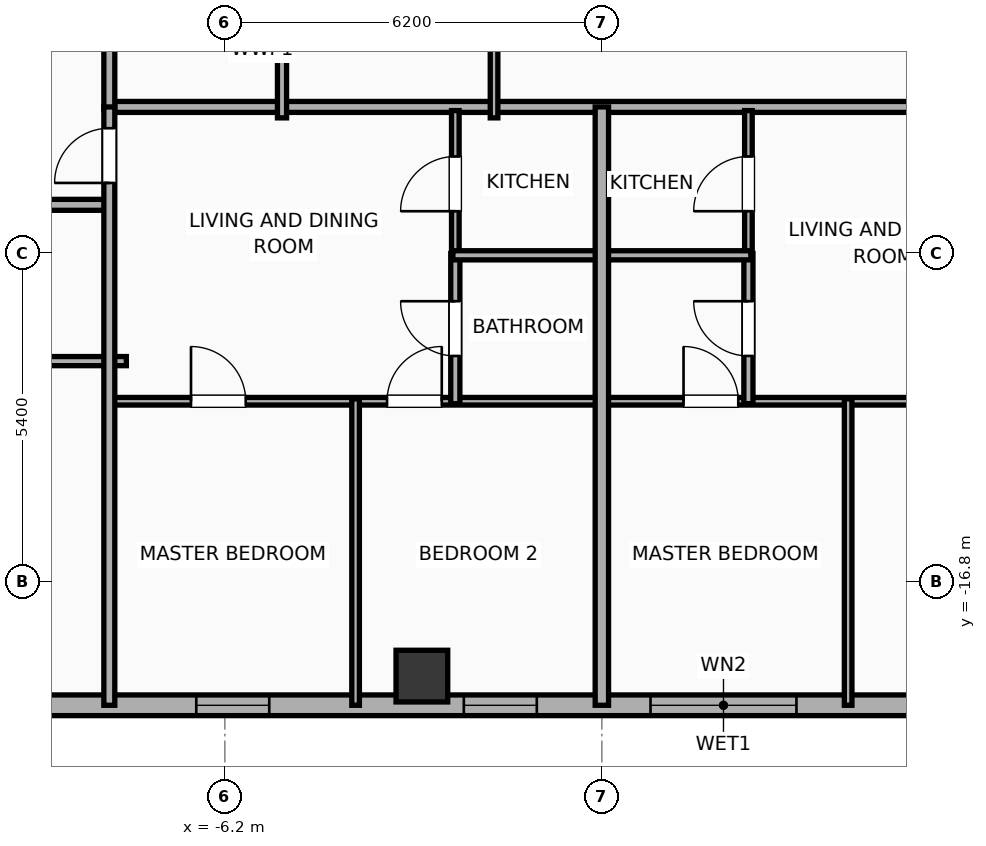
"""IFC4 building model, lengths in metres.
Left out: names, types, materials, properties, quantities, classifications, styles, units other than length and angle.
Written with IfcOpenShell. Run it as: python <this file> out.ifc"""

import sys

from ifc_helpers import new_model, si_unit, direction, frame, frame_2d, origin, origin_2d, place, context, subcontext, project, spatial, rectangle, hollow_rectangle, extrude, element, fill, save


model = new_model("IFC4")
c1 = context("Model", 3, precision=1e-05, world=origin(), true_north=direction((0.0, 1.0)))
c2 = subcontext(c1, "Body", "Model", "MODEL_VIEW")
j1 = project(units=[si_unit("LENGTHUNIT", "METRE"), si_unit("PLANEANGLEUNIT", "RADIAN")], contexts=[c1])
p1 = place(None, origin())
s1 = spatial("IfcSite", under=j1, at=p1, CompositionType="ELEMENT")
p2 = place(p1, origin())
s2 = spatial("IfcBuilding", under=s1, at=p2, CompositionType="ELEMENT")
p3 = place(p2, frame((0.0, 0.0, 247.0)))
s3 = spatial("IfcBuildingStorey", under=s2, at=p3, CompositionType="ELEMENT", Elevation=247.0)
p4 = place(p3, frame((-2.96, -18.35, 0.0), z_axis=(0.0, 0.0, 1.0), x_axis=(1.0, 0.0, 0.0)))
e1 = element("IfcColumn", 1, at=p4, inside=s3, PredefinedType="COLUMN", context=c2, shape_type="SweptSolid", body=[
    extrude(hollow_rectangle(XDim=0.85, YDim=0.85, WallThickness=0.028, at=origin_2d()), origin(), (0.0, 0.0, 1.0), 3.9),
])
p5 = place(p3, frame((26.783, -18.83, 0.0), z_axis=(0.0, 0.0, 1.0), x_axis=(-1.0, 0.0, 0.0)))
e2 = element("IfcWall", 2, at=p5, inside=s3, PredefinedType="ELEMENTEDWALL", context=c2, shape_type="SweptSolid", body=[
    extrude(rectangle(XDim=49.566, YDim=0.34, at=frame_2d((24.783, 0.0))), origin(), (0.0, 0.0, 1.0), 3.65),
])
p6 = place(p5, frame((23.583, 0.0, 0.75)))
e3 = element("IfcOpeningElement", 3, at=p6, cuts=e2, PredefinedType="OPENING", context=c2, shape_type="SweptSolid", body=[
    extrude(rectangle(XDim=2.4, YDim=2.1, at=frame_2d((1.2, 1.05))), frame((0.0, 0.18, 0.0), z_axis=(0.0, -1.0, 0.0), x_axis=(1.0, 0.0, 0.0)), (0.0, 0.0, 1.0), 0.36),
])
p7 = place(p5, frame((41.756, 0.0, 0.75)))
e4 = element("IfcOpeningElement", 4, at=p7, cuts=e2, PredefinedType="OPENING", context=c2, shape_type="SweptSolid", body=[
    extrude(rectangle(XDim=2.4, YDim=2.1, at=frame_2d((1.2, 1.05))), frame((0.0, 0.18, 0.0), z_axis=(0.0, -1.0, 0.0), x_axis=(1.0, 0.0, 0.0)), (0.0, 0.0, 1.0), 0.36),
])
p8 = place(p5, frame((47.222, 0.0, 0.75)))
e5 = element("IfcOpeningElement", 5, at=p8, cuts=e2, PredefinedType="OPENING", context=c2, shape_type="SweptSolid", body=[
    extrude(rectangle(XDim=1.2, YDim=2.05, at=frame_2d((0.6, 1.025))), frame((0.0, 0.18, 0.0), z_axis=(0.0, -1.0, 0.0), x_axis=(1.0, 0.0, 0.0)), (0.0, 0.0, 1.0), 0.36),
])
p9 = place(p5, frame((45.131, 0.0, 0.75)))
e6 = element("IfcOpeningElement", 6, at=p9, cuts=e2, PredefinedType="OPENING", context=c2, shape_type="SweptSolid", body=[
    extrude(rectangle(XDim=1.2, YDim=2.05, at=frame_2d((0.6, 1.025))), frame((0.0, 0.18, 0.0), z_axis=(0.0, -1.0, 0.0), x_axis=(1.0, 0.0, 0.0)), (0.0, 0.0, 1.0), 0.36),
])
p10 = place(p5, frame((37.289, 0.0, 0.75)))
e7 = element("IfcOpeningElement", 7, at=p10, cuts=e2, PredefinedType="OPENING", context=c2, shape_type="SweptSolid", body=[
    extrude(rectangle(XDim=1.2, YDim=2.05, at=frame_2d((0.6, 1.025))), frame((0.0, 0.18, 0.0), z_axis=(0.0, -1.0, 0.0), x_axis=(1.0, 0.0, 0.0)), (0.0, 0.0, 1.0), 0.36),
])
p11 = place(p5, frame((15.715, 0.0, 0.75)))
e8 = element("IfcOpeningElement", 8, at=p11, cuts=e2, PredefinedType="OPENING", context=c2, shape_type="SweptSolid", body=[
    extrude(rectangle(XDim=1.2, YDim=2.05, at=frame_2d((0.6, 1.025))), frame((0.0, 0.18, 0.0), z_axis=(0.0, -1.0, 0.0), x_axis=(1.0, 0.0, 0.0)), (0.0, 0.0, 1.0), 0.36),
])
p12 = place(p5, frame((12.022, 0.0, 0.75)))
e9 = element("IfcOpeningElement", 9, at=p12, cuts=e2, PredefinedType="OPENING", context=c2, shape_type="SweptSolid", body=[
    extrude(rectangle(XDim=1.2, YDim=2.05, at=frame_2d((0.6, 1.025))), frame((0.0, 0.18, 0.0), z_axis=(0.0, -1.0, 0.0), x_axis=(1.0, 0.0, 0.0)), (0.0, 0.0, 1.0), 0.36),
])
p13 = place(p5, frame((8.09, 0.0, 0.75)))
e10 = element("IfcOpeningElement", 10, at=p13, cuts=e2, PredefinedType="OPENING", context=c2, shape_type="SweptSolid", body=[
    extrude(rectangle(XDim=1.2, YDim=2.05, at=frame_2d((0.6, 1.025))), frame((0.0, 0.18, 0.0), z_axis=(0.0, -1.0, 0.0), x_axis=(1.0, 0.0, 0.0)), (0.0, 0.0, 1.0), 0.36),
])
p14 = place(p5, frame((4.637, 0.0, 0.75)))
e11 = element("IfcOpeningElement", 11, at=p14, cuts=e2, PredefinedType="OPENING", context=c2, shape_type="SweptSolid", body=[
    extrude(rectangle(XDim=1.2, YDim=2.05, at=frame_2d((0.6, 1.025))), frame((0.0, 0.18, 0.0), z_axis=(0.0, -1.0, 0.0), x_axis=(1.0, 0.0, 0.0)), (0.0, 0.0, 1.0), 0.36),
])
p15 = place(p5, frame((1.811, 0.0, 0.75)))
e12 = element("IfcOpeningElement", 12, at=p15, cuts=e2, PredefinedType="OPENING", context=c2, shape_type="SweptSolid", body=[
    extrude(rectangle(XDim=1.2, YDim=2.05, at=frame_2d((0.6, 1.025))), frame((0.0, 0.18, 0.0), z_axis=(0.0, -1.0, 0.0), x_axis=(1.0, 0.0, 0.0)), (0.0, 0.0, 1.0), 0.36),
])
p16 = place(p5, frame((32.253, 0.0, 0.75)))
e13 = element("IfcOpeningElement", 13, at=p16, cuts=e2, PredefinedType="OPENING", context=c2, shape_type="SweptSolid", body=[
    extrude(rectangle(XDim=1.2, YDim=2.05, at=frame_2d((0.6, 1.025))), frame((0.0, 0.18, 0.0), z_axis=(0.0, -1.0, 0.0), x_axis=(1.0, 0.0, 0.0)), (0.0, 0.0, 1.0), 0.36),
])
p17 = place(p5, frame((27.853, 0.0, 0.75)))
e14 = element("IfcOpeningElement", 14, at=p17, cuts=e2, PredefinedType="OPENING", context=c2, shape_type="SweptSolid", body=[
    extrude(rectangle(XDim=1.2, YDim=2.05, at=frame_2d((0.6, 1.025))), frame((0.0, 0.18, 0.0), z_axis=(0.0, -1.0, 0.0), x_axis=(1.0, 0.0, 0.0)), (0.0, 0.0, 1.0), 0.36),
])
p18 = place(p5, frame((20.473, 0.0, 0.75)))
e15 = element("IfcOpeningElement", 15, at=p18, cuts=e2, PredefinedType="OPENING", context=c2, shape_type="SweptSolid", body=[
    extrude(rectangle(XDim=1.2, YDim=2.05, at=frame_2d((0.6, 1.025))), frame((0.0, 0.18, 0.0), z_axis=(0.0, -1.0, 0.0), x_axis=(1.0, 0.0, 0.0)), (0.0, 0.0, 1.0), 0.36),
])
p19 = place(p3, frame((-8.15, -8.99, 0.0), z_axis=(0.0, 0.0, 1.0), x_axis=(1.0, 0.0, 0.0)))
e16 = element("IfcWall", 16, at=p19, inside=s3, PredefinedType="PARTITIONING", context=c2, shape_type="SweptSolid", body=[
    extrude(rectangle(XDim=16.3, YDim=0.18, at=frame_2d((8.15, 0.0))), origin(), (0.0, 0.0, 1.0), 3.65),
])
p20 = place(p3, frame((-8.1, -9.03, 0.0), z_axis=(0.0, 0.0, 1.0), x_axis=(0.0, 1.0, 0.0)))
e17 = element("IfcWall", 17, at=p20, inside=s3, PredefinedType="PARTITIONING", context=c2, shape_type="SweptSolid", body=[
    extrude(rectangle(XDim=18.06, YDim=0.18, at=frame_2d((9.03, 0.0))), origin(), (0.0, 0.0, 1.0), 3.65),
])
p21 = place(p20, frame((1.306, 0.0, 0.0)))
e18 = element("IfcOpeningElement", 18, at=p21, cuts=e17, PredefinedType="OPENING", context=c2, shape_type="SweptSolid", body=[
    extrude(rectangle(XDim=1.0, YDim=2.05, at=frame_2d((0.5, 1.025))), frame((0.0, 0.1, 0.0), z_axis=(0.0, -1.0, 0.0), x_axis=(1.0, 0.0, 0.0)), (0.0, 0.0, 1.0), 0.2),
])
p22 = place(p20, frame((10.361, 0.0, 0.0)))
e19 = element("IfcOpeningElement", 19, at=p22, cuts=e17, PredefinedType="OPENING", context=c2, shape_type="SweptSolid", body=[
    extrude(rectangle(XDim=0.95, YDim=2.05, at=frame_2d((0.475, 1.025))), frame((0.0, 0.1, 0.0), z_axis=(0.0, -1.0, 0.0), x_axis=(1.0, 0.0, 0.0)), (0.0, 0.0, 1.0), 0.2),
])
p23 = place(p3, frame((-5.26, -9.17, 0.0), z_axis=(0.0, 0.0, 1.0), x_axis=(0.0, 1.0, 0.0)))
e20 = element("IfcWall", 20, at=p23, inside=s3, PredefinedType="PLUMBINGWALL", context=c2, shape_type="SweptSolid", body=[
    extrude(rectangle(XDim=3.35, YDim=0.15, at=frame_2d((1.675, 0.0))), origin(), (0.0, 0.0, 1.0), 3.65),
])
p24 = place(p3, frame((-1.773, -9.17, 0.0), z_axis=(0.0, 0.0, 1.0), x_axis=(0.0, 1.0, 0.0)))
e21 = element("IfcWall", 21, at=p24, inside=s3, PredefinedType="PARTITIONING", context=c2, shape_type="SweptSolid", body=[
    extrude(rectangle(XDim=18.29, YDim=0.125, at=frame_2d((9.145, 0.0))), origin(), (0.0, 0.0, 1.0), 3.65),
])
p25 = place(p24, frame((8.67, 0.0, 0.0)))
e22 = element("IfcOpeningElement", 22, at=p25, cuts=e21, PredefinedType="OPENING", context=c2, shape_type="SweptSolid", body=[
    extrude(rectangle(XDim=0.95, YDim=2.05, at=frame_2d((0.475, 1.025))), frame((0.0, 0.073, 0.0), z_axis=(0.0, -1.0, 0.0), x_axis=(1.0, 0.0, 0.0)), (0.0, 0.0, 1.0), 0.145),
])
p26 = place(p3, frame((-10.217, -13.17, 0.0), z_axis=(0.0, 0.0, 1.0), x_axis=(1.0, 0.0, 0.0)))
e23 = element("IfcWall", 23, at=p26, inside=s3, PredefinedType="PLUMBINGWALL", context=c2, shape_type="SweptSolid", body=[
    extrude(rectangle(XDim=2.397, YDim=0.15, at=frame_2d((1.198, 0.0))), origin(), (0.0, 0.0, 1.0), 3.65),
])
p27 = place(p3, frame((-26.23, -10.6, 0.0), z_axis=(0.0, 0.0, 1.0), x_axis=(1.0, 0.0, 0.0)))
e24 = element("IfcWall", 24, at=p27, inside=s3, PredefinedType="PARTITIONING", context=c2, shape_type="SweptSolid", body=[
    extrude(rectangle(XDim=18.15, YDim=0.18, at=frame_2d((9.075, 0.0))), origin(), (0.0, 0.0, 1.0), 3.65),
])
p28 = place(p27, frame((2.659, 0.0, 0.0)))
e25 = element("IfcOpeningElement", 25, at=p28, cuts=e24, PredefinedType="OPENING", context=c2, shape_type="SweptSolid", body=[
    extrude(rectangle(XDim=0.9, YDim=2.05, at=frame_2d((0.45, 1.025))), frame((0.0, 0.1, 0.0), z_axis=(0.0, -1.0, 0.0), x_axis=(1.0, 0.0, 0.0)), (0.0, 0.0, 1.0), 0.2),
])
p29 = place(p27, frame((9.703, 0.0, 0.0)))
e26 = element("IfcOpeningElement", 26, at=p29, cuts=e24, PredefinedType="OPENING", context=c2, shape_type="SweptSolid", body=[
    extrude(rectangle(XDim=1.15, YDim=2.05, at=frame_2d((0.575, 1.025))), frame((0.0, 0.1, 0.0), z_axis=(0.0, -1.0, 0.0), x_axis=(1.0, 0.0, 0.0)), (0.0, 0.0, 1.0), 0.2),
])
p30 = place(p27, frame((14.792, 0.0, 0.0)))
e27 = element("IfcOpeningElement", 27, at=p30, cuts=e24, PredefinedType="OPENING", context=c2, shape_type="SweptSolid", body=[
    extrude(rectangle(XDim=0.9, YDim=2.05, at=frame_2d((0.45, 1.025))), frame((0.0, 0.1, 0.0), z_axis=(0.0, -1.0, 0.0), x_axis=(1.0, 0.0, 0.0)), (0.0, 0.0, 1.0), 0.2),
])
p31 = place(p3, frame((-8.08, -13.83, 0.0), z_axis=(0.0, 0.0, 1.0), x_axis=(1.0, 0.0, 0.0)))
e28 = element("IfcWall", 28, at=p31, inside=s3, PredefinedType="PARTITIONING", context=c2, shape_type="SweptSolid", body=[
    extrude(rectangle(XDim=8.06, YDim=0.125, at=frame_2d((4.03, 0.0))), origin(), (0.0, 0.0, 1.0), 3.65),
])
p32 = place(p31, frame((1.323, 0.0, 0.0)))
e29 = element("IfcOpeningElement", 29, at=p32, cuts=e28, PredefinedType="OPENING", context=c2, shape_type="SweptSolid", body=[
    extrude(rectangle(XDim=0.9, YDim=2.05, at=frame_2d((0.45, 1.025))), frame((0.0, 0.073, 0.0), z_axis=(0.0, -1.0, 0.0), x_axis=(1.0, 0.0, 0.0)), (0.0, 0.0, 1.0), 0.145),
])
p33 = place(p31, frame((4.547, 0.0, 0.0)))
e30 = element("IfcOpeningElement", 30, at=p33, cuts=e28, PredefinedType="OPENING", context=c2, shape_type="SweptSolid", body=[
    extrude(rectangle(XDim=0.9, YDim=2.05, at=frame_2d((0.45, 1.025))), frame((0.0, 0.073, 0.0), z_axis=(0.0, -1.0, 0.0), x_axis=(1.0, 0.0, 0.0)), (0.0, 0.0, 1.0), 0.145),
])
p34 = place(p3, frame((-2.41, -11.46, 0.0), z_axis=(0.0, 0.0, 1.0), x_axis=(0.0, 1.0, 0.0)))
e31 = element("IfcWall", 31, at=p34, inside=s3, PredefinedType="PARTITIONING", context=c2, shape_type="SweptSolid", body=[
    extrude(rectangle(XDim=2.41, YDim=0.125, at=frame_2d((1.205, 0.0))), origin(), (0.0, 0.0, 1.0), 3.65),
])
p35 = place(p34, frame((0.755, 0.0, 0.0)))
e32 = element("IfcOpeningElement", 32, at=p35, cuts=e31, PredefinedType="OPENING", context=c2, shape_type="SweptSolid", body=[
    extrude(rectangle(XDim=0.9, YDim=2.05, at=frame_2d((0.45, 1.025))), frame((0.0, 0.073, 0.0), z_axis=(0.0, -1.0, 0.0), x_axis=(1.0, 0.0, 0.0)), (0.0, 0.0, 1.0), 0.145),
])
p36 = place(p3, frame((-2.41, -13.87, 0.0), z_axis=(0.0, 0.0, 1.0), x_axis=(0.0, 1.0, 0.0)))
e33 = element("IfcWall", 33, at=p36, inside=s3, PredefinedType="PLUMBINGWALL", context=c2, shape_type="SweptSolid", body=[
    extrude(rectangle(XDim=2.47, YDim=0.15, at=frame_2d((1.235, 0.0))), origin(), (0.0, 0.0, 1.0), 3.65),
])
p37 = place(p36, frame((0.785, 0.0, 0.0)))
e34 = element("IfcOpeningElement", 34, at=p37, cuts=e33, PredefinedType="OPENING", context=c2, shape_type="SweptSolid", body=[
    extrude(rectangle(XDim=0.9, YDim=2.05, at=frame_2d((0.45, 1.025))), frame((0.0, 0.085, 0.0), z_axis=(0.0, -1.0, 0.0), x_axis=(1.0, 0.0, 0.0)), (0.0, 0.0, 1.0), 0.17),
])
p38 = place(p3, frame((-2.45, -11.43, 0.0), z_axis=(0.0, 0.0, 1.0), x_axis=(1.0, 0.0, 0.0)))
e35 = element("IfcWall", 35, at=p38, inside=s3, PredefinedType="PLUMBINGWALL", context=c2, shape_type="SweptSolid", body=[
    extrude(rectangle(XDim=2.43, YDim=0.15, at=frame_2d((1.215, 0.0))), origin(), (0.0, 0.0, 1.0), 3.65),
])
p39 = place(p3, frame((-4.05, -18.83, 0.0), z_axis=(0.0, 0.0, 1.0), x_axis=(0.0, 1.0, 0.0)))
e36 = element("IfcWall", 36, at=p39, inside=s3, PredefinedType="PARTITIONING", context=c2, shape_type="SweptSolid", body=[
    extrude(rectangle(XDim=5.04, YDim=0.125, at=frame_2d((2.52, 0.0))), origin(), (0.0, 0.0, 1.0), 3.65),
])
p40 = place(p3, frame((-8.1, -18.83, 0.0), z_axis=(0.0, 0.0, 1.0), x_axis=(0.0, 1.0, 0.0)))
e37 = element("IfcWall", 37, at=p40, inside=s3, PredefinedType="PARTITIONING", context=c2, shape_type="SweptSolid", body=[
    extrude(rectangle(XDim=9.84, YDim=0.18, at=frame_2d((4.92, 0.0))), origin(), (0.0, 0.0, 1.0), 3.65),
])
p41 = place(p40, frame((8.59, 0.0, 0.0)))
e38 = element("IfcOpeningElement", 38, at=p41, cuts=e37, PredefinedType="OPENING", context=c2, shape_type="SweptSolid", body=[
    extrude(rectangle(XDim=0.9, YDim=2.05, at=frame_2d((0.45, 1.025))), frame((0.0, 0.1, 0.0), z_axis=(0.0, -1.0, 0.0), x_axis=(1.0, 0.0, 0.0)), (0.0, 0.0, 1.0), 0.2),
])
p42 = place(p3, frame((0.02, -13.83, 0.0), z_axis=(0.0, 0.0, 1.0), x_axis=(1.0, 0.0, 0.0)))
e39 = element("IfcWall", 39, at=p42, inside=s3, PredefinedType="PARTITIONING", context=c2, shape_type="SweptSolid", body=[
    extrude(rectangle(XDim=8.06, YDim=0.125, at=frame_2d((4.03, 0.0))), origin(), (0.0, 0.0, 1.0), 3.65),
])
p43 = place(p42, frame((1.323, 0.0, 0.0)))
e40 = element("IfcOpeningElement", 40, at=p43, cuts=e39, PredefinedType="OPENING", context=c2, shape_type="SweptSolid", body=[
    extrude(rectangle(XDim=0.9, YDim=2.05, at=frame_2d((0.45, 1.025))), frame((0.0, 0.073, 0.0), z_axis=(0.0, -1.0, 0.0), x_axis=(1.0, 0.0, 0.0)), (0.0, 0.0, 1.0), 0.145),
])
p44 = place(p42, frame((5.837, 0.0, 0.0)))
e41 = element("IfcOpeningElement", 41, at=p44, cuts=e39, PredefinedType="OPENING", context=c2, shape_type="SweptSolid", body=[
    extrude(rectangle(XDim=0.9, YDim=2.05, at=frame_2d((0.45, 1.025))), frame((0.0, 0.073, 0.0), z_axis=(0.0, -1.0, 0.0), x_axis=(1.0, 0.0, 0.0)), (0.0, 0.0, 1.0), 0.145),
])
p45 = place(p3, frame((2.41, -11.46, 0.0), z_axis=(0.0, 0.0, 1.0), x_axis=(0.0, 1.0, 0.0)))
e42 = element("IfcWall", 42, at=p45, inside=s3, PredefinedType="PARTITIONING", context=c2, shape_type="SweptSolid", body=[
    extrude(rectangle(XDim=2.41, YDim=0.125, at=frame_2d((1.205, 0.0))), origin(), (0.0, 0.0, 1.0), 3.65),
])
p46 = place(p45, frame((0.755, 0.0, 0.0)))
e43 = element("IfcOpeningElement", 43, at=p46, cuts=e42, PredefinedType="OPENING", context=c2, shape_type="SweptSolid", body=[
    extrude(rectangle(XDim=0.9, YDim=2.05, at=frame_2d((0.45, 1.025))), frame((0.0, 0.073, 0.0), z_axis=(0.0, -1.0, 0.0), x_axis=(1.0, 0.0, 0.0)), (0.0, 0.0, 1.0), 0.145),
])
p47 = place(p3, frame((2.41, -13.87, 0.0), z_axis=(0.0, 0.0, 1.0), x_axis=(0.0, 1.0, 0.0)))
e44 = element("IfcWall", 44, at=p47, inside=s3, PredefinedType="PLUMBINGWALL", context=c2, shape_type="SweptSolid", body=[
    extrude(rectangle(XDim=2.47, YDim=0.15, at=frame_2d((1.235, 0.0))), origin(), (0.0, 0.0, 1.0), 3.65),
])
p48 = place(p47, frame((0.785, 0.0, 0.0)))
e45 = element("IfcOpeningElement", 45, at=p48, cuts=e44, PredefinedType="OPENING", context=c2, shape_type="SweptSolid", body=[
    extrude(rectangle(XDim=0.9, YDim=2.05, at=frame_2d((0.45, 1.025))), frame((0.0, 0.085, 0.0), z_axis=(0.0, -1.0, 0.0), x_axis=(1.0, 0.0, 0.0)), (0.0, 0.0, 1.0), 0.17),
])
p49 = place(p3, frame((0.02, -11.43, 0.0), z_axis=(0.0, 0.0, 1.0), x_axis=(1.0, 0.0, 0.0)))
e46 = element("IfcWall", 46, at=p49, inside=s3, PredefinedType="PLUMBINGWALL", context=c2, shape_type="SweptSolid", body=[
    extrude(rectangle(XDim=2.43, YDim=0.15, at=frame_2d((1.215, 0.0))), origin(), (0.0, 0.0, 1.0), 3.65),
])
p50 = place(p3, frame((4.05, -18.83, 0.0), z_axis=(0.0, 0.0, 1.0), x_axis=(0.0, 1.0, 0.0)))
e47 = element("IfcWall", 47, at=p50, inside=s3, PredefinedType="PARTITIONING", context=c2, shape_type="SweptSolid", body=[
    extrude(rectangle(XDim=5.04, YDim=0.125, at=frame_2d((2.52, 0.0))), origin(), (0.0, 0.0, 1.0), 3.65),
])
p51 = place(p3, frame((0.0, -18.83, 0.0), z_axis=(0.0, 0.0, 1.0), x_axis=(0.0, 1.0, 0.0)))
e48 = element("IfcWall", 48, at=p51, inside=s3, PredefinedType="PARTITIONING", context=c2, shape_type="SweptSolid", body=[
    extrude(rectangle(XDim=9.84, YDim=0.22, at=frame_2d((4.92, 0.0))), origin(), (0.0, 0.0, 1.0), 3.65),
])
p52 = place(p6, origin())
e49 = element("IfcWindow", 49, at=p52, inside=s3, PartitioningType="SINGLE_PANEL", PredefinedType="WINDOW", context=c2, shape_type="SweptSolid", body=[
    extrude(rectangle(XDim=2.4, YDim=2.1, at=frame_2d((1.2, 1.05))), frame((0.0, 0.03, 0.0), z_axis=(0.0, -1.0, 0.0), x_axis=(1.0, 0.0, 0.0)), (0.0, 0.0, 1.0), 0.06),
])
fill(e3, e49)
p53 = place(p16, origin())
e50 = element("IfcWindow", 50, at=p53, inside=s3, PartitioningType="SINGLE_PANEL", PredefinedType="WINDOW", context=c2, shape_type="SweptSolid", body=[
    extrude(rectangle(XDim=1.2, YDim=2.05, at=frame_2d((0.6, 1.025))), frame((0.0, 0.03, 0.0), z_axis=(0.0, -1.0, 0.0), x_axis=(1.0, 0.0, 0.0)), (0.0, 0.0, 1.0), 0.06),
])
fill(e13, e50)
p54 = place(p17, origin())
e51 = element("IfcWindow", 51, at=p54, inside=s3, PartitioningType="SINGLE_PANEL", PredefinedType="WINDOW", context=c2, shape_type="SweptSolid", body=[
    extrude(rectangle(XDim=1.2, YDim=2.05, at=frame_2d((0.6, 1.025))), frame((0.0, 0.03, 0.0), z_axis=(0.0, -1.0, 0.0), x_axis=(1.0, 0.0, 0.0)), (0.0, 0.0, 1.0), 0.06),
])
fill(e14, e51)
p55 = place(p32, origin())
e52 = element("IfcDoor", 52, at=p55, inside=s3, OperationType="SINGLE_SWING_LEFT", PredefinedType="DOOR", context=c2, shape_type="SweptSolid", body=[
    extrude(rectangle(XDim=0.9, YDim=2.05, at=frame_2d((0.45, 1.025))), frame((0.0, 0.025, 0.0), z_axis=(0.0, -1.0, 0.0), x_axis=(1.0, 0.0, 0.0)), (0.0, 0.0, 1.0), 0.05),
])
fill(e29, e52)
p56 = place(p33, origin())
e53 = element("IfcDoor", 53, at=p56, inside=s3, OperationType="SINGLE_SWING_RIGHT", PredefinedType="DOOR", context=c2, shape_type="SweptSolid", body=[
    extrude(rectangle(XDim=0.9, YDim=2.05, at=frame_2d((0.45, 1.025))), frame((0.0, 0.025, 0.0), z_axis=(0.0, -1.0, 0.0), x_axis=(1.0, 0.0, 0.0)), (0.0, 0.0, 1.0), 0.05),
])
fill(e30, e53)
p57 = place(p35, origin())
e54 = element("IfcDoor", 54, at=p57, inside=s3, OperationType="SINGLE_SWING_LEFT", PredefinedType="DOOR", context=c2, shape_type="SweptSolid", body=[
    extrude(rectangle(XDim=0.9, YDim=2.05, at=frame_2d((0.45, 1.025))), frame((0.0, 0.025, 0.0), z_axis=(0.0, -1.0, 0.0), x_axis=(1.0, 0.0, 0.0)), (0.0, 0.0, 1.0), 0.05),
])
fill(e32, e54)
p58 = place(p37, origin())
e55 = element("IfcDoor", 55, at=p58, inside=s3, OperationType="SINGLE_SWING_RIGHT", PredefinedType="DOOR", context=c2, shape_type="SweptSolid", body=[
    extrude(rectangle(XDim=0.9, YDim=2.05, at=frame_2d((0.45, 1.025))), frame((0.0, 0.025, 0.0), z_axis=(0.0, -1.0, 0.0), x_axis=(1.0, 0.0, 0.0)), (0.0, 0.0, 1.0), 0.05),
])
fill(e34, e55)
p59 = place(p41, origin())
e56 = element("IfcDoor", 56, at=p59, inside=s3, OperationType="SINGLE_SWING_LEFT", PredefinedType="DOOR", context=c2, shape_type="SweptSolid", body=[
    extrude(rectangle(XDim=0.9, YDim=2.05, at=frame_2d((0.45, 1.025))), frame((0.0, 0.025, 0.0), z_axis=(0.0, -1.0, 0.0), x_axis=(1.0, 0.0, 0.0)), (0.0, 0.0, 1.0), 0.05),
])
fill(e38, e56)
p60 = place(p43, origin())
e57 = element("IfcDoor", 57, at=p60, inside=s3, OperationType="SINGLE_SWING_LEFT", PredefinedType="DOOR", context=c2, shape_type="SweptSolid", body=[
    extrude(rectangle(XDim=0.9, YDim=2.05, at=frame_2d((0.45, 1.025))), frame((0.0, 0.025, 0.0), z_axis=(0.0, -1.0, 0.0), x_axis=(1.0, 0.0, 0.0)), (0.0, 0.0, 1.0), 0.05),
])
fill(e40, e57)
p61 = place(p46, origin())
e58 = element("IfcDoor", 58, at=p61, inside=s3, OperationType="SINGLE_SWING_LEFT", PredefinedType="DOOR", context=c2, shape_type="SweptSolid", body=[
    extrude(rectangle(XDim=0.9, YDim=2.05, at=frame_2d((0.45, 1.025))), frame((0.0, 0.025, 0.0), z_axis=(0.0, -1.0, 0.0), x_axis=(1.0, 0.0, 0.0)), (0.0, 0.0, 1.0), 0.05),
])
fill(e43, e58)
p62 = place(p48, origin())
e59 = element("IfcDoor", 59, at=p62, inside=s3, OperationType="SINGLE_SWING_RIGHT", PredefinedType="DOOR", context=c2, shape_type="SweptSolid", body=[
    extrude(rectangle(XDim=0.9, YDim=2.05, at=frame_2d((0.45, 1.025))), frame((0.0, 0.025, 0.0), z_axis=(0.0, -1.0, 0.0), x_axis=(1.0, 0.0, 0.0)), (0.0, 0.0, 1.0), 0.05),
])
fill(e45, e59)
save(model, sys.argv[1])
